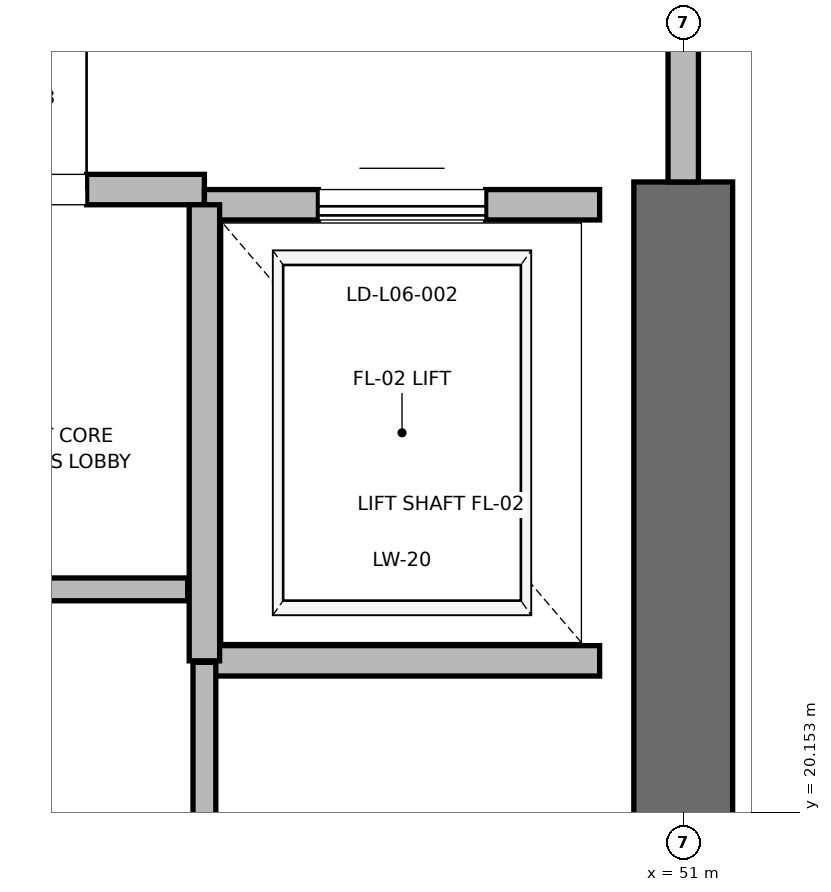
"""IFC4 building model, lengths in metres.
Left out: names, types, materials, properties, quantities, classifications, styles, units other than length and angle.
Written with IfcOpenShell. Run it as: python <this file> out.ifc"""

import sys

from ifc_helpers import new_model, si_unit, direction, frame, frame_2d, origin, place, context, subcontext, project, spatial, rectangle, extrude, element, fill, save


model = new_model("IFC4")
c1 = context("Model", 3, precision=1e-05, world=origin(), true_north=direction((0.0, 1.0)))
c2 = subcontext(c1, "Body", "Model", "MODEL_VIEW")
j1 = project(units=[si_unit("LENGTHUNIT", "METRE"), si_unit("PLANEANGLEUNIT", "RADIAN")], contexts=[c1])
p1 = place(None, origin())
s1 = spatial("IfcSite", under=j1, at=p1, CompositionType="ELEMENT")
p2 = place(p1, origin())
s2 = spatial("IfcBuilding", under=s1, at=p2, CompositionType="ELEMENT")
p3 = place(p2, frame((0.0, 0.0, 31.6)))
s3 = spatial("IfcBuildingStorey", under=s2, at=p3, CompositionType="ELEMENT", Elevation=31.6)
p4 = place(p3, frame((51.0, 18.5, 0.0), z_axis=(0.0, 0.0, 1.0), x_axis=(0.0, 1.0, 0.0)))
e1 = element("IfcWall", 1, at=p4, inside=s3, PredefinedType="SHEAR", context=c2, shape_type="SweptSolid", body=[
    extrude(rectangle(XDim=5.8, YDim=0.65, at=frame_2d((2.9, 0.0))), origin(), (0.0, 0.0, 1.0), 3.76),
])
p5 = place(p3, frame((45.15, 24.25, 0.0), z_axis=(0.0, 0.0, 1.0), x_axis=(1.0, 0.0, 0.0)))
e2 = element("IfcWall", 2, at=p5, inside=s3, PredefinedType="PARTITIONING", context=c2, shape_type="SweptSolid", body=[
    extrude(rectangle(XDim=2.7, YDim=0.2, at=frame_2d((1.35, 0.0))), origin(), (0.0, 0.0, 1.0), 3.76),
])
p6 = place(p5, frame((0.775, 0.0, 0.0)))
e3 = element("IfcOpeningElement", 3, at=p6, cuts=e2, PredefinedType="OPENING", context=c2, shape_type="SweptSolid", body=[
    extrude(rectangle(XDim=1.15, YDim=2.2, at=frame_2d((0.575, 1.1))), frame((0.0, 0.1, 0.0), z_axis=(0.0, -1.0, 0.0), x_axis=(1.0, 0.0, 0.0)), (0.0, 0.0, 1.0), 0.2),
])
p7 = place(p3, frame((51.0, 24.3, 0.0), z_axis=(0.0, 0.0, 1.0), x_axis=(0.0, 1.0, 0.0)))
e4 = element("IfcWall", 4, at=p7, inside=s3, PredefinedType="PARTITIONING", context=c2, shape_type="SweptSolid", body=[
    extrude(rectangle(XDim=3.4, YDim=0.2, at=frame_2d((1.7, 0.0))), origin(), (0.0, 0.0, 1.0), 2.54),
])
p8 = place(p7, frame((1.125, 0.0, 0.0)))
e5 = element("IfcOpeningElement", 5, at=p8, cuts=e4, PredefinedType="OPENING", context=c2, shape_type="SweptSolid", body=[
    extrude(rectangle(XDim=1.15, YDim=2.2, at=frame_2d((0.575, 1.1))), frame((0.0, 0.1, 0.0), z_axis=(0.0, -1.0, 0.0), x_axis=(1.0, 0.0, 0.0)), (0.0, 0.0, 1.0), 0.2),
])
p9 = place(p3, frame((47.85, 21.15, 0.0), z_axis=(0.0, 0.0, 1.0), x_axis=(1.0, 0.0, 0.0)))
e6 = element("IfcWall", 6, at=p9, inside=s3, PredefinedType="SOLIDWALL", context=c2, shape_type="SweptSolid", body=[
    extrude(rectangle(XDim=2.6, YDim=0.2, at=frame_2d((1.3, 0.0))), origin(), (0.0, 0.0, 1.0), 3.76),
])
p10 = place(p3, frame((50.45, 24.15, 0.0), z_axis=(0.0, 0.0, 1.0), x_axis=(-1.0, 0.0, 0.0)))
e7 = element("IfcWall", 7, at=p10, inside=s3, PredefinedType="SOLIDWALL", context=c2, shape_type="SweptSolid", body=[
    extrude(rectangle(XDim=2.6, YDim=0.2, at=frame_2d((1.3, 0.0))), origin(), (0.0, 0.0, 1.0), 2.54),
])
p11 = place(p10, frame((0.75, 0.0, 0.0)))
e8 = element("IfcOpeningElement", 8, at=p11, cuts=e7, PredefinedType="OPENING", context=c2, shape_type="SweptSolid", body=[
    extrude(rectangle(XDim=1.1, YDim=2.2, at=frame_2d((0.55, 1.1))), frame((0.0, 0.1, 0.0), z_axis=(0.0, -1.0, 0.0), x_axis=(1.0, 0.0, 0.0)), (0.0, 0.0, 1.0), 0.2),
])
p12 = place(p3, frame((47.85, 24.15, 0.0), z_axis=(0.0, 0.0, 1.0), x_axis=(0.0, -1.0, 0.0)))
e9 = element("IfcWall", 9, at=p12, inside=s3, PredefinedType="SOLIDWALL", context=c2, shape_type="SweptSolid", body=[
    extrude(rectangle(XDim=3.0, YDim=0.2, at=frame_2d((1.5, 0.0))), origin(), (0.0, 0.0, 1.0), 3.76),
])
p13 = place(p3, frame((47.85, 18.6, 0.0), z_axis=(0.0, 0.0, 1.0), x_axis=(0.0, 1.0, 0.0)))
e10 = element("IfcWall", 10, at=p13, inside=s3, PredefinedType="PARTITIONING", context=c2, shape_type="SweptSolid", body=[
    extrude(rectangle(XDim=2.54, YDim=0.15, at=frame_2d((1.27, 0.0))), origin(), (0.0, 0.0, 1.0), 2.85),
])
p14 = place(p3, frame((41.76, 21.62, 0.0), z_axis=(0.0, 0.0, 1.0), x_axis=(1.0, 0.0, 0.0)))
e11 = element("IfcWall", 11, at=p14, inside=s3, PredefinedType="PARTITIONING", context=c2, shape_type="SweptSolid", body=[
    extrude(rectangle(XDim=5.98, YDim=0.15, at=frame_2d((2.99, 0.0))), origin(), (0.0, 0.0, 1.0), 2.85),
])
p15 = place(p14, frame((2.49, 0.0, 0.0)))
e12 = element("IfcOpeningElement", 12, at=p15, cuts=e11, PredefinedType="OPENING", context=c2, shape_type="SweptSolid", body=[
    extrude(rectangle(XDim=1.0, YDim=2.15, at=frame_2d((0.5, 1.075))), frame((0.0, 0.075, 0.0), z_axis=(0.0, -1.0, 0.0), x_axis=(1.0, 0.0, 0.0)), (0.0, 0.0, 1.0), 0.15),
])
p16 = place(p6, origin())
e13 = element("IfcDoor", 13, at=p16, inside=s3, OperationType="SINGLE_SWING_RIGHT", PredefinedType="DOOR", context=c2, shape_type="SweptSolid", body=[
    extrude(rectangle(XDim=1.15, YDim=2.2, at=frame_2d((0.575, 1.1))), frame((0.0, 0.025, 0.0), z_axis=(0.0, -1.0, 0.0), x_axis=(1.0, 0.0, 0.0)), (0.0, 0.0, 1.0), 0.05),
])
fill(e3, e13)
p17 = place(p11, origin())
e14 = element("IfcDoor", 14, at=p17, inside=s3, OperationType="SLIDING_TO_RIGHT", PredefinedType="DOOR", context=c2, shape_type="SweptSolid", body=[
    extrude(rectangle(XDim=1.1, YDim=2.2, at=frame_2d((0.55, 1.1))), frame((0.0, 0.025, 0.0), z_axis=(0.0, -1.0, 0.0), x_axis=(1.0, 0.0, 0.0)), (0.0, 0.0, 1.0), 0.05),
])
fill(e8, e14)
save(model, sys.argv[1])
